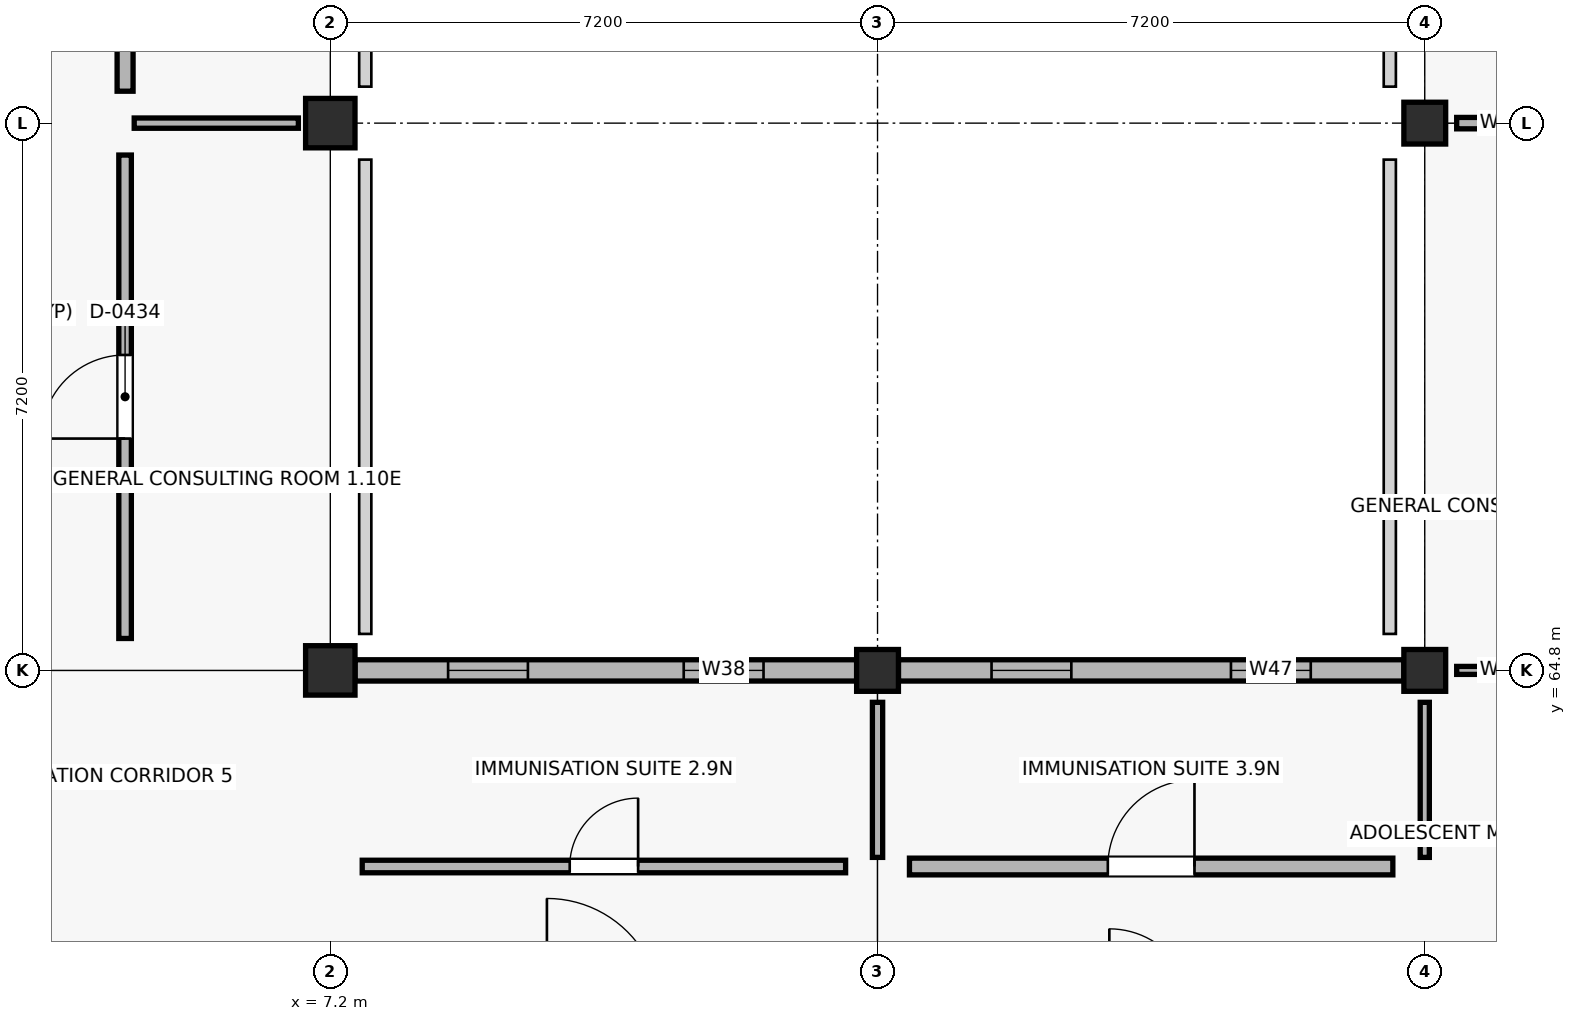
"""IFC4 building model, lengths in metres.
Left out: names, types, materials, properties, quantities, classifications, styles, units other than length and angle.
Written with IfcOpenShell. Run it as: python <this file> out.ifc"""

import sys

from ifc_helpers import new_model, si_unit, direction, frame, frame_2d, origin, origin_2d, place, context, subcontext, project, spatial, rectangle, extrude, element, fill, save


model = new_model("IFC4")
c1 = context("Model", 3, precision=1e-05, world=origin(), true_north=direction((0.0, 1.0)))
c2 = subcontext(c1, "Body", "Model", "MODEL_VIEW")
j1 = project(units=[si_unit("LENGTHUNIT", "METRE"), si_unit("PLANEANGLEUNIT", "RADIAN")], contexts=[c1])
p1 = place(None, origin())
s1 = spatial("IfcSite", under=j1, at=p1, CompositionType="ELEMENT")
p2 = place(p1, origin())
s2 = spatial("IfcBuilding", under=s1, at=p2, CompositionType="ELEMENT")
p3 = place(p2, frame((0.0, 0.0, 9.0)))
s3 = spatial("IfcBuildingStorey", under=s2, at=p3, CompositionType="ELEMENT", Elevation=9.0)
for number, where, z_axis, x_axis in (
    (1, (7.2, 64.8, 0.0), (0.0, 0.0, 1.0), (1.0, 0.0, 0.0)),
    (2, (7.2, 72.0, 0.0), (0.0, 0.0, 1.0), (1.0, 0.0, 0.0)),
):
    element("IfcColumn", number, at=place(p3, frame(where, z_axis=z_axis, x_axis=x_axis)), inside=s3, PredefinedType="COLUMN", context=c2, shape_type="SweptSolid", body=[
        extrude(rectangle(XDim=0.65, YDim=0.65, at=origin_2d()), origin(), (0.0, 0.0, 1.0), 4.5),
    ])
for number, where, z_axis, x_axis in (
    (3, (14.4, 64.8, 0.0), (0.0, 0.0, 1.0), (1.0, 0.0, 0.0)),
    (4, (21.6, 64.8, 0.0), (0.0, 0.0, 1.0), (1.0, 0.0, 0.0)),
    (5, (21.6, 72.0, 0.0), (0.0, 0.0, 1.0), (1.0, 0.0, 0.0)),
):
    element("IfcColumn", number, at=place(p3, frame(where, z_axis=z_axis, x_axis=x_axis)), inside=s3, PredefinedType="COLUMN", context=c2, shape_type="SweptSolid", body=[
        extrude(rectangle(XDim=0.55, YDim=0.55, at=origin_2d()), origin(), (0.0, 0.0, 1.0), 4.5),
    ])
p4 = place(p3, frame((14.125, 64.8, 0.0), z_axis=(0.0, 0.0, 1.0), x_axis=(-1.0, 0.0, 0.0)))
e6 = element("IfcWall", 6, at=p4, inside=s3, PredefinedType="STANDARD", context=c2, shape_type="SweptSolid", body=[
    extrude(rectangle(XDim=6.6, YDim=0.28, at=frame_2d((3.3, 0.0))), origin(), (0.0, 0.0, 1.0), 3.59),
])
p5 = place(p4, frame((1.225, 0.0, 0.9)))
e7 = element("IfcOpeningElement", 7, at=p5, cuts=e6, PredefinedType="OPENING", context=c2, shape_type="SweptSolid", body=[
    extrude(rectangle(XDim=1.05, YDim=1.75, at=frame_2d((0.525, 0.875))), frame((0.0, 0.15, 0.0), z_axis=(0.0, -1.0, 0.0), x_axis=(1.0, 0.0, 0.0)), (0.0, 0.0, 1.0), 0.3),
])
p6 = place(p4, frame((4.325, 0.0, 0.9)))
e8 = element("IfcOpeningElement", 8, at=p6, cuts=e6, PredefinedType="OPENING", context=c2, shape_type="SweptSolid", body=[
    extrude(rectangle(XDim=1.05, YDim=1.75, at=frame_2d((0.525, 0.875))), frame((0.0, 0.15, 0.0), z_axis=(0.0, -1.0, 0.0), x_axis=(1.0, 0.0, 0.0)), (0.0, 0.0, 1.0), 0.3),
])
p7 = place(p3, frame((21.325, 64.8, 0.0), z_axis=(0.0, 0.0, 1.0), x_axis=(-1.0, 0.0, 0.0)))
e9 = element("IfcWall", 9, at=p7, inside=s3, PredefinedType="STANDARD", context=c2, shape_type="SweptSolid", body=[
    extrude(rectangle(XDim=6.65, YDim=0.28, at=frame_2d((3.325, 0.0))), origin(), (0.0, 0.0, 1.0), 3.59),
])
p8 = place(p7, frame((1.225, 0.0, 0.9)))
e10 = element("IfcOpeningElement", 10, at=p8, cuts=e9, PredefinedType="OPENING", context=c2, shape_type="SweptSolid", body=[
    extrude(rectangle(XDim=1.05, YDim=1.88, at=frame_2d((0.525, 0.94))), frame((0.0, 0.15, 0.0), z_axis=(0.0, -1.0, 0.0), x_axis=(1.0, 0.0, 0.0)), (0.0, 0.0, 1.0), 0.3),
])
p9 = place(p7, frame((4.375, 0.0, 0.9)))
e11 = element("IfcOpeningElement", 11, at=p9, cuts=e9, PredefinedType="OPENING", context=c2, shape_type="SweptSolid", body=[
    extrude(rectangle(XDim=1.05, YDim=1.88, at=frame_2d((0.525, 0.94))), frame((0.0, 0.15, 0.0), z_axis=(0.0, -1.0, 0.0), x_axis=(1.0, 0.0, 0.0)), (0.0, 0.0, 1.0), 0.3),
])
p10 = place(p3, frame((4.5, 65.22, 0.0), z_axis=(0.0, 0.0, 1.0), x_axis=(0.0, 1.0, 0.0)))
e12 = element("IfcWall", 12, at=p10, inside=s3, PredefinedType="PARTITIONING", context=c2, shape_type="SweptSolid", body=[
    extrude(rectangle(XDim=6.36, YDim=0.165, at=frame_2d((3.18, 0.0))), origin(), (0.0, 0.0, 1.0), 3.38),
])
p11 = place(p10, frame((2.63, 0.0, 0.0)))
e13 = element("IfcOpeningElement", 13, at=p11, cuts=e12, PredefinedType="OPENING", context=c2, shape_type="SweptSolid", body=[
    extrude(rectangle(XDim=1.1, YDim=2.04, at=frame_2d((0.55, 1.02))), frame((0.0, 0.093, 0.0), z_axis=(0.0, -1.0, 0.0), x_axis=(1.0, 0.0, 0.0)), (0.0, 0.0, 1.0), 0.185),
])
p12 = place(p3, frame((4.62, 72.0, 0.0), z_axis=(0.0, 0.0, 1.0), x_axis=(1.0, 0.0, 0.0)))
e14 = element("IfcWall", 14, at=p12, inside=s3, PredefinedType="PARTITIONING", context=c2, shape_type="SweptSolid", body=[
    extrude(rectangle(XDim=2.16, YDim=0.135, at=frame_2d((1.08, 0.0))), origin(), (0.0, 0.0, 1.0), 3.38),
])
p13 = place(p3, frame((4.5, 72.42, 0.0), z_axis=(0.0, 0.0, 1.0), x_axis=(0.0, 1.0, 0.0)))
e15 = element("IfcWall", 15, at=p13, inside=s3, PredefinedType="PLUMBINGWALL", context=c2, shape_type="SweptSolid", body=[
    extrude(rectangle(XDim=6.36, YDim=0.21, at=frame_2d((3.18, 0.0))), origin(), (0.0, 0.0, 1.0), 3.38),
])
p14 = place(p13, frame((2.59, 0.0, 0.0)))
e16 = element("IfcOpeningElement", 16, at=p14, cuts=e15, PredefinedType="OPENING", context=c2, shape_type="SweptSolid", body=[
    extrude(rectangle(XDim=1.18, YDim=2.04, at=frame_2d((0.59, 1.02))), frame((0.0, 0.115, 0.0), z_axis=(0.0, -1.0, 0.0), x_axis=(1.0, 0.0, 0.0)), (0.0, 0.0, 1.0), 0.23),
])
p15 = place(p3, frame((7.62, 62.22, 0.0), z_axis=(0.0, 0.0, 1.0), x_axis=(1.0, 0.0, 0.0)))
e17 = element("IfcWall", 17, at=p15, inside=s3, PredefinedType="PARTITIONING", context=c2, shape_type="SweptSolid", body=[
    extrude(rectangle(XDim=6.36, YDim=0.165, at=frame_2d((3.18, 0.0))), origin(), (0.0, 0.0, 1.0), 3.38),
])
p16 = place(p15, frame((2.73, 0.0, 0.0)))
e18 = element("IfcOpeningElement", 18, at=p16, cuts=e17, PredefinedType="OPENING", context=c2, shape_type="SweptSolid", body=[
    extrude(rectangle(XDim=0.9, YDim=2.09, at=frame_2d((0.45, 1.045))), frame((0.0, 0.093, 0.0), z_axis=(0.0, -1.0, 0.0), x_axis=(1.0, 0.0, 0.0)), (0.0, 0.0, 1.0), 0.185),
])
p17 = place(p3, frame((14.4, 62.34, 0.0), z_axis=(0.0, 0.0, 1.0), x_axis=(0.0, 1.0, 0.0)))
e19 = element("IfcWall", 19, at=p17, inside=s3, PredefinedType="PARTITIONING", context=c2, shape_type="SweptSolid", body=[
    extrude(rectangle(XDim=2.04, YDim=0.135, at=frame_2d((1.02, 0.0))), origin(), (0.0, 0.0, 1.0), 3.38),
])
p18 = place(p3, frame((14.82, 62.22, 0.0), z_axis=(0.0, 0.0, 1.0), x_axis=(1.0, 0.0, 0.0)))
e20 = element("IfcWall", 20, at=p18, inside=s3, PredefinedType="SOLIDWALL", context=c2, shape_type="SweptSolid", body=[
    extrude(rectangle(XDim=6.36, YDim=0.22, at=frame_2d((3.18, 0.0))), origin(), (0.0, 0.0, 1.0), 3.38),
])
p19 = place(p18, frame((2.61, 0.0, 0.0)))
e21 = element("IfcOpeningElement", 21, at=p19, cuts=e20, PredefinedType="OPENING", context=c2, shape_type="SweptSolid", body=[
    extrude(rectangle(XDim=1.14, YDim=2.09, at=frame_2d((0.57, 1.045))), frame((0.0, 0.12, 0.0), z_axis=(0.0, -1.0, 0.0), x_axis=(1.0, 0.0, 0.0)), (0.0, 0.0, 1.0), 0.24),
])
p20 = place(p3, frame((21.6, 62.34, 0.0), z_axis=(0.0, 0.0, 1.0), x_axis=(0.0, 1.0, 0.0)))
e22 = element("IfcWall", 22, at=p20, inside=s3, PredefinedType="PARTITIONING", context=c2, shape_type="SweptSolid", body=[
    extrude(rectangle(XDim=2.04, YDim=0.12, at=frame_2d((1.02, 0.0))), origin(), (0.0, 0.0, 1.0), 3.38),
])
p21 = place(p3, frame((22.02, 64.8, 0.0), z_axis=(0.0, 0.0, 1.0), x_axis=(1.0, 0.0, 0.0)))
e23 = element("IfcWall", 23, at=p21, inside=s3, PredefinedType="PARTITIONING", context=c2, shape_type="SweptSolid", body=[
    extrude(rectangle(XDim=2.16, YDim=0.105, at=frame_2d((1.08, 0.0))), origin(), (0.0, 0.0, 1.0), 3.38),
])
p22 = place(p3, frame((22.02, 72.0, 0.0), z_axis=(0.0, 0.0, 1.0), x_axis=(1.0, 0.0, 0.0)))
e24 = element("IfcWall", 24, at=p22, inside=s3, PredefinedType="PARTITIONING", context=c2, shape_type="SweptSolid", body=[
    extrude(rectangle(XDim=2.16, YDim=0.15, at=frame_2d((1.08, 0.0))), origin(), (0.0, 0.0, 1.0), 3.38),
])
p23 = place(p5, origin())
e25 = element("IfcWindow", 25, at=p23, inside=s3, PartitioningType="SINGLE_PANEL", PredefinedType="WINDOW", context=c2, shape_type="SweptSolid", body=[
    extrude(rectangle(XDim=1.05, YDim=1.75, at=frame_2d((0.525, 0.875))), frame((0.0, 0.03, 0.0), z_axis=(0.0, -1.0, 0.0), x_axis=(1.0, 0.0, 0.0)), (0.0, 0.0, 1.0), 0.06),
])
fill(e7, e25)
p24 = place(p6, origin())
e26 = element("IfcWindow", 26, at=p24, inside=s3, PartitioningType="SINGLE_PANEL", PredefinedType="WINDOW", context=c2, shape_type="SweptSolid", body=[
    extrude(rectangle(XDim=1.05, YDim=1.75, at=frame_2d((0.525, 0.875))), frame((0.0, 0.03, 0.0), z_axis=(0.0, -1.0, 0.0), x_axis=(1.0, 0.0, 0.0)), (0.0, 0.0, 1.0), 0.06),
])
fill(e8, e26)
p25 = place(p8, origin())
e27 = element("IfcWindow", 27, at=p25, inside=s3, PartitioningType="SINGLE_PANEL", PredefinedType="WINDOW", context=c2, shape_type="SweptSolid", body=[
    extrude(rectangle(XDim=1.05, YDim=1.88, at=frame_2d((0.525, 0.94))), frame((0.0, 0.03, 0.0), z_axis=(0.0, -1.0, 0.0), x_axis=(1.0, 0.0, 0.0)), (0.0, 0.0, 1.0), 0.06),
])
fill(e10, e27)
p26 = place(p9, origin())
e28 = element("IfcWindow", 28, at=p26, inside=s3, PartitioningType="SINGLE_PANEL", PredefinedType="WINDOW", context=c2, shape_type="SweptSolid", body=[
    extrude(rectangle(XDim=1.05, YDim=1.88, at=frame_2d((0.525, 0.94))), frame((0.0, 0.03, 0.0), z_axis=(0.0, -1.0, 0.0), x_axis=(1.0, 0.0, 0.0)), (0.0, 0.0, 1.0), 0.06),
])
fill(e11, e28)
p27 = place(p11, origin())
e29 = element("IfcDoor", 29, at=p27, inside=s3, OperationType="SINGLE_SWING_LEFT", PredefinedType="DOOR", context=c2, shape_type="SweptSolid", body=[
    extrude(rectangle(XDim=1.1, YDim=2.04, at=frame_2d((0.55, 1.02))), frame((0.0, 0.025, 0.0), z_axis=(0.0, -1.0, 0.0), x_axis=(1.0, 0.0, 0.0)), (0.0, 0.0, 1.0), 0.05),
])
fill(e13, e29)
p28 = place(p16, origin())
e30 = element("IfcDoor", 30, at=p28, inside=s3, OperationType="SINGLE_SWING_RIGHT", PredefinedType="DOOR", context=c2, shape_type="SweptSolid", body=[
    extrude(rectangle(XDim=0.9, YDim=2.09, at=frame_2d((0.45, 1.045))), frame((0.0, 0.025, 0.0), z_axis=(0.0, -1.0, 0.0), x_axis=(1.0, 0.0, 0.0)), (0.0, 0.0, 1.0), 0.05),
])
fill(e18, e30)
p29 = place(p19, origin())
e31 = element("IfcDoor", 31, at=p29, inside=s3, OperationType="SINGLE_SWING_RIGHT", PredefinedType="DOOR", context=c2, shape_type="SweptSolid", body=[
    extrude(rectangle(XDim=1.14, YDim=2.09, at=frame_2d((0.57, 1.045))), frame((0.0, 0.025, 0.0), z_axis=(0.0, -1.0, 0.0), x_axis=(1.0, 0.0, 0.0)), (0.0, 0.0, 1.0), 0.05),
])
fill(e21, e31)
save(model, sys.argv[1])
